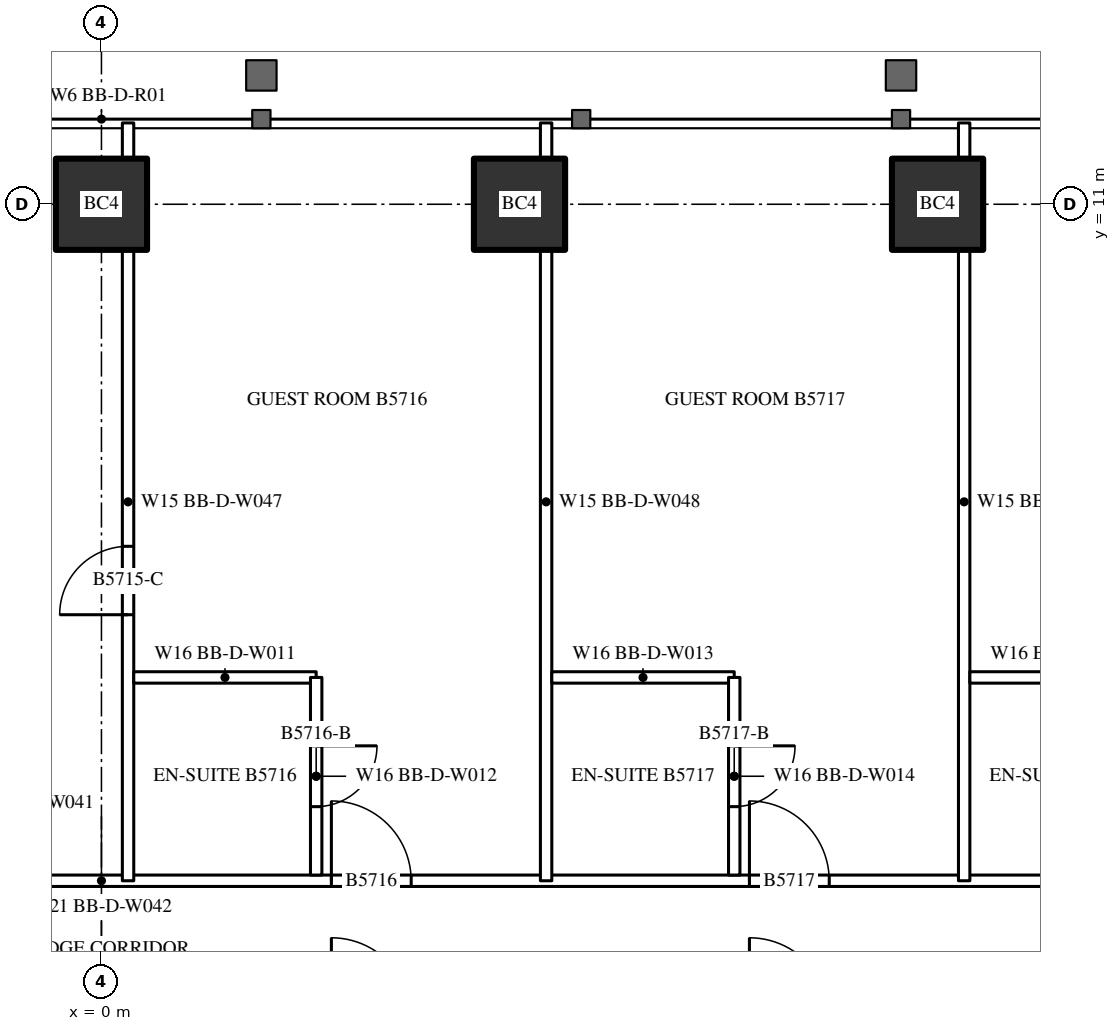
"""IFC4 building model, lengths in metres.
Left out: names, types, materials, properties, quantities, classifications, styles, units other than length and angle.
Written with IfcOpenShell. Run it as: python <this file> out.ifc"""

import sys

from ifc_helpers import new_model, si_unit, direction, frame, frame_2d, origin, origin_2d, place, context, subcontext, project, spatial, rectangle, hollow_rectangle, extrude, element, fill, save


model = new_model("IFC4")
c1 = context("Model", 3, precision=1e-05, world=origin(), true_north=direction((0.0, 1.0)))
c2 = subcontext(c1, "Body", "Model", "MODEL_VIEW")
j1 = project(units=[si_unit("LENGTHUNIT", "METRE"), si_unit("PLANEANGLEUNIT", "RADIAN")], contexts=[c1])
p1 = place(None, origin())
s1 = spatial("IfcSite", under=j1, at=p1, CompositionType="ELEMENT")
p2 = place(p1, origin())
s2 = spatial("IfcBuilding", under=s1, at=p2, CompositionType="ELEMENT")
p3 = place(p2, frame((0.0, 0.0, 215.3)))
s3 = spatial("IfcBuildingStorey", under=s2, at=p3, CompositionType="ELEMENT", Elevation=215.3)
for number, where, z_axis, x_axis in (
    (1, (0.0, 11.0, 0.0), (0.0, 0.0, 1.0), (1.0, 0.0, 0.0)),
    (2, (5.5, 11.0, 0.0), (0.0, 0.0, 1.0), (1.0, 0.0, 0.0)),
    (3, (11.0, 11.0, 0.0), (0.0, 0.0, 1.0), (1.0, 0.0, 0.0)),
):
    element("IfcColumn", number, at=place(p3, frame(where, z_axis=z_axis, x_axis=x_axis)), inside=s3, PredefinedType="COLUMN", context=c2, shape_type="SweptSolid", body=[
        extrude(hollow_rectangle(XDim=1.2, YDim=1.2, WallThickness=0.12, at=origin_2d()), origin(), (0.0, 0.0, 1.0), 3.6),
    ])
p4 = place(p3, frame((-27.5, 2.1, 0.0), z_axis=(0.0, 0.0, 1.0), x_axis=(1.0, 0.0, 0.0)))
e4 = element("IfcWall", 4, at=p4, inside=s3, PredefinedType="PARTITIONING", context=c2, shape_type="SweptSolid", body=[
    extrude(rectangle(XDim=55.0, YDim=0.15, at=frame_2d((27.5, 0.0))), origin(), (0.0, 0.0, 1.0), 3.4),
])
p5 = place(p4, frame((2.025, 0.0, 0.0)))
e5 = element("IfcOpeningElement", 5, at=p5, cuts=e4, PredefinedType="OPENING", context=c2, shape_type="SweptSolid", body=[
    extrude(rectangle(XDim=1.05, YDim=2.4, at=frame_2d((0.525, 1.2))), frame((0.0, 0.085, 0.0), z_axis=(0.0, -1.0, 0.0), x_axis=(1.0, 0.0, 0.0)), (0.0, 0.0, 1.0), 0.17),
])
p6 = place(p4, frame((8.525, 0.0, 0.0)))
e6 = element("IfcOpeningElement", 6, at=p6, cuts=e4, PredefinedType="OPENING", context=c2, shape_type="SweptSolid", body=[
    extrude(rectangle(XDim=1.05, YDim=2.4, at=frame_2d((0.525, 1.2))), frame((0.0, 0.085, 0.0), z_axis=(0.0, -1.0, 0.0), x_axis=(1.0, 0.0, 0.0)), (0.0, 0.0, 1.0), 0.17),
])
p7 = place(p4, frame((14.025, 0.0, 0.0)))
e7 = element("IfcOpeningElement", 7, at=p7, cuts=e4, PredefinedType="OPENING", context=c2, shape_type="SweptSolid", body=[
    extrude(rectangle(XDim=1.05, YDim=2.4, at=frame_2d((0.525, 1.2))), frame((0.0, 0.085, 0.0), z_axis=(0.0, -1.0, 0.0), x_axis=(1.0, 0.0, 0.0)), (0.0, 0.0, 1.0), 0.17),
])
p8 = place(p4, frame((19.525, 0.0, 0.0)))
e8 = element("IfcOpeningElement", 8, at=p8, cuts=e4, PredefinedType="OPENING", context=c2, shape_type="SweptSolid", body=[
    extrude(rectangle(XDim=1.05, YDim=2.4, at=frame_2d((0.525, 1.2))), frame((0.0, 0.085, 0.0), z_axis=(0.0, -1.0, 0.0), x_axis=(1.0, 0.0, 0.0)), (0.0, 0.0, 1.0), 0.17),
])
p9 = place(p4, frame((25.025, 0.0, 0.0)))
e9 = element("IfcOpeningElement", 9, at=p9, cuts=e4, PredefinedType="OPENING", context=c2, shape_type="SweptSolid", body=[
    extrude(rectangle(XDim=1.05, YDim=2.4, at=frame_2d((0.525, 1.2))), frame((0.0, 0.085, 0.0), z_axis=(0.0, -1.0, 0.0), x_axis=(1.0, 0.0, 0.0)), (0.0, 0.0, 1.0), 0.17),
])
p10 = place(p4, frame((30.525, 0.0, 0.0)))
e10 = element("IfcOpeningElement", 10, at=p10, cuts=e4, PredefinedType="OPENING", context=c2, shape_type="SweptSolid", body=[
    extrude(rectangle(XDim=1.05, YDim=2.4, at=frame_2d((0.525, 1.2))), frame((0.0, 0.085, 0.0), z_axis=(0.0, -1.0, 0.0), x_axis=(1.0, 0.0, 0.0)), (0.0, 0.0, 1.0), 0.17),
])
p11 = place(p4, frame((36.025, 0.0, 0.0)))
e11 = element("IfcOpeningElement", 11, at=p11, cuts=e4, PredefinedType="OPENING", context=c2, shape_type="SweptSolid", body=[
    extrude(rectangle(XDim=1.05, YDim=2.4, at=frame_2d((0.525, 1.2))), frame((0.0, 0.085, 0.0), z_axis=(0.0, -1.0, 0.0), x_axis=(1.0, 0.0, 0.0)), (0.0, 0.0, 1.0), 0.17),
])
p12 = place(p4, frame((41.525, 0.0, 0.0)))
e12 = element("IfcOpeningElement", 12, at=p12, cuts=e4, PredefinedType="OPENING", context=c2, shape_type="SweptSolid", body=[
    extrude(rectangle(XDim=1.05, YDim=2.4, at=frame_2d((0.525, 1.2))), frame((0.0, 0.085, 0.0), z_axis=(0.0, -1.0, 0.0), x_axis=(1.0, 0.0, 0.0)), (0.0, 0.0, 1.0), 0.17),
])
p13 = place(p4, frame((47.025, 0.0, 0.0)))
e13 = element("IfcOpeningElement", 13, at=p13, cuts=e4, PredefinedType="OPENING", context=c2, shape_type="SweptSolid", body=[
    extrude(rectangle(XDim=1.05, YDim=2.4, at=frame_2d((0.525, 1.2))), frame((0.0, 0.085, 0.0), z_axis=(0.0, -1.0, 0.0), x_axis=(1.0, 0.0, 0.0)), (0.0, 0.0, 1.0), 0.17),
])
p14 = place(p4, frame((52.525, 0.0, 0.0)))
e14 = element("IfcOpeningElement", 14, at=p14, cuts=e4, PredefinedType="OPENING", context=c2, shape_type="SweptSolid", body=[
    extrude(rectangle(XDim=1.05, YDim=2.4, at=frame_2d((0.525, 1.2))), frame((0.0, 0.085, 0.0), z_axis=(0.0, -1.0, 0.0), x_axis=(1.0, 0.0, 0.0)), (0.0, 0.0, 1.0), 0.17),
])
p15 = place(p3, frame((0.35, 2.1, 0.0), z_axis=(0.0, 0.0, 1.0), x_axis=(0.0, 1.0, 0.0)))
e15 = element("IfcWall", 15, at=p15, inside=s3, PredefinedType="PARTITIONING", context=c2, shape_type="SweptSolid", body=[
    extrude(rectangle(XDim=9.97, YDim=0.15, at=frame_2d((4.985, 0.0))), origin(), (0.0, 0.0, 1.0), 3.4),
])
p16 = place(p15, frame((3.5, 0.0, 0.0)))
e16 = element("IfcOpeningElement", 16, at=p16, cuts=e15, PredefinedType="OPENING", context=c2, shape_type="SweptSolid", body=[
    extrude(rectangle(XDim=0.9, YDim=2.2, at=frame_2d((0.45, 1.1))), frame((0.0, 0.085, 0.0), z_axis=(0.0, -1.0, 0.0), x_axis=(1.0, 0.0, 0.0)), (0.0, 0.0, 1.0), 0.17),
])
for number, where, z_axis, x_axis in (
    (17, (5.85, 2.1, 0.0), (0.0, 0.0, 1.0), (0.0, 1.0, 0.0)),
    (18, (11.35, 2.1, 0.0), (0.0, 0.0, 1.0), (0.0, 1.0, 0.0)),
):
    element("IfcWall", number, at=place(p3, frame(where, z_axis=z_axis, x_axis=x_axis)), inside=s3, PredefinedType="PARTITIONING", context=c2, shape_type="SweptSolid", body=[
        extrude(rectangle(XDim=9.97, YDim=0.15, at=frame_2d((4.985, 0.0))), origin(), (0.0, 0.0, 1.0), 3.4),
    ])
p17 = place(p3, frame((0.425, 4.775, 0.0), z_axis=(0.0, 0.0, 1.0), x_axis=(1.0, 0.0, 0.0)))
e19 = element("IfcWall", 19, at=p17, inside=s3, PredefinedType="PARTITIONING", context=c2, shape_type="SweptSolid", body=[
    extrude(rectangle(XDim=2.4, YDim=0.15, at=frame_2d((1.2, 0.0))), origin(), (0.0, 0.0, 1.0), 3.4),
])
p18 = place(p3, frame((2.825, 2.175, 0.0), z_axis=(0.0, 0.0, 1.0), x_axis=(0.0, 1.0, 0.0)))
e20 = element("IfcWall", 20, at=p18, inside=s3, PredefinedType="PARTITIONING", context=c2, shape_type="SweptSolid", body=[
    extrude(rectangle(XDim=2.6, YDim=0.15, at=frame_2d((1.3, 0.0))), origin(), (0.0, 0.0, 1.0), 3.4),
])
p19 = place(p18, frame((0.9, 0.0, 0.0)))
e21 = element("IfcOpeningElement", 21, at=p19, cuts=e20, PredefinedType="OPENING", context=c2, shape_type="SweptSolid", body=[
    extrude(rectangle(XDim=0.8, YDim=2.2, at=frame_2d((0.4, 1.1))), frame((0.0, 0.085, 0.0), z_axis=(0.0, -1.0, 0.0), x_axis=(1.0, 0.0, 0.0)), (0.0, 0.0, 1.0), 0.17),
])
p20 = place(p3, frame((5.925, 4.775, 0.0), z_axis=(0.0, 0.0, 1.0), x_axis=(1.0, 0.0, 0.0)))
e22 = element("IfcWall", 22, at=p20, inside=s3, PredefinedType="PARTITIONING", context=c2, shape_type="SweptSolid", body=[
    extrude(rectangle(XDim=2.4, YDim=0.15, at=frame_2d((1.2, 0.0))), origin(), (0.0, 0.0, 1.0), 3.4),
])
p21 = place(p3, frame((8.325, 2.175, 0.0), z_axis=(0.0, 0.0, 1.0), x_axis=(0.0, 1.0, 0.0)))
e23 = element("IfcWall", 23, at=p21, inside=s3, PredefinedType="PARTITIONING", context=c2, shape_type="SweptSolid", body=[
    extrude(rectangle(XDim=2.6, YDim=0.15, at=frame_2d((1.3, 0.0))), origin(), (0.0, 0.0, 1.0), 3.4),
])
p22 = place(p21, frame((0.9, 0.0, 0.0)))
e24 = element("IfcOpeningElement", 24, at=p22, cuts=e23, PredefinedType="OPENING", context=c2, shape_type="SweptSolid", body=[
    extrude(rectangle(XDim=0.8, YDim=2.2, at=frame_2d((0.4, 1.1))), frame((0.0, 0.085, 0.0), z_axis=(0.0, -1.0, 0.0), x_axis=(1.0, 0.0, 0.0)), (0.0, 0.0, 1.0), 0.17),
])
p23 = place(p3, frame((11.425, 4.775, 0.0), z_axis=(0.0, 0.0, 1.0), x_axis=(1.0, 0.0, 0.0)))
e25 = element("IfcWall", 25, at=p23, inside=s3, PredefinedType="PARTITIONING", context=c2, shape_type="SweptSolid", body=[
    extrude(rectangle(XDim=2.4, YDim=0.15, at=frame_2d((1.2, 0.0))), origin(), (0.0, 0.0, 1.0), 3.4),
])
p24 = place(p19, origin())
e26 = element("IfcDoor", 26, at=p24, inside=s3, OperationType="SINGLE_SWING_RIGHT", PredefinedType="DOOR", context=c2, shape_type="SweptSolid", body=[
    extrude(rectangle(XDim=0.8, YDim=2.2, at=frame_2d((0.4, 1.1))), frame((0.0, 0.025, 0.0), z_axis=(0.0, -1.0, 0.0), x_axis=(1.0, 0.0, 0.0)), (0.0, 0.0, 1.0), 0.05),
])
fill(e21, e26)
p25 = place(p10, origin())
e27 = element("IfcDoor", 27, at=p25, inside=s3, OperationType="SINGLE_SWING_LEFT", PredefinedType="DOOR", context=c2, shape_type="SweptSolid", body=[
    extrude(rectangle(XDim=1.05, YDim=2.4, at=frame_2d((0.525, 1.2))), frame((0.0, 0.025, 0.0), z_axis=(0.0, -1.0, 0.0), x_axis=(1.0, 0.0, 0.0)), (0.0, 0.0, 1.0), 0.05),
])
fill(e10, e27)
p26 = place(p22, origin())
e28 = element("IfcDoor", 28, at=p26, inside=s3, OperationType="SINGLE_SWING_RIGHT", PredefinedType="DOOR", context=c2, shape_type="SweptSolid", body=[
    extrude(rectangle(XDim=0.8, YDim=2.2, at=frame_2d((0.4, 1.1))), frame((0.0, 0.025, 0.0), z_axis=(0.0, -1.0, 0.0), x_axis=(1.0, 0.0, 0.0)), (0.0, 0.0, 1.0), 0.05),
])
fill(e24, e28)
p27 = place(p11, origin())
e29 = element("IfcDoor", 29, at=p27, inside=s3, OperationType="SINGLE_SWING_LEFT", PredefinedType="DOOR", context=c2, shape_type="SweptSolid", body=[
    extrude(rectangle(XDim=1.05, YDim=2.4, at=frame_2d((0.525, 1.2))), frame((0.0, 0.025, 0.0), z_axis=(0.0, -1.0, 0.0), x_axis=(1.0, 0.0, 0.0)), (0.0, 0.0, 1.0), 0.05),
])
fill(e11, e29)
p28 = place(p16, origin())
e30 = element("IfcDoor", 30, at=p28, inside=s3, OperationType="SINGLE_SWING_LEFT", PredefinedType="DOOR", context=c2, shape_type="SweptSolid", body=[
    extrude(rectangle(XDim=0.9, YDim=2.2, at=frame_2d((0.45, 1.1))), frame((0.0, 0.025, 0.0), z_axis=(0.0, -1.0, 0.0), x_axis=(1.0, 0.0, 0.0)), (0.0, 0.0, 1.0), 0.05),
])
fill(e16, e30)
save(model, sys.argv[1])
